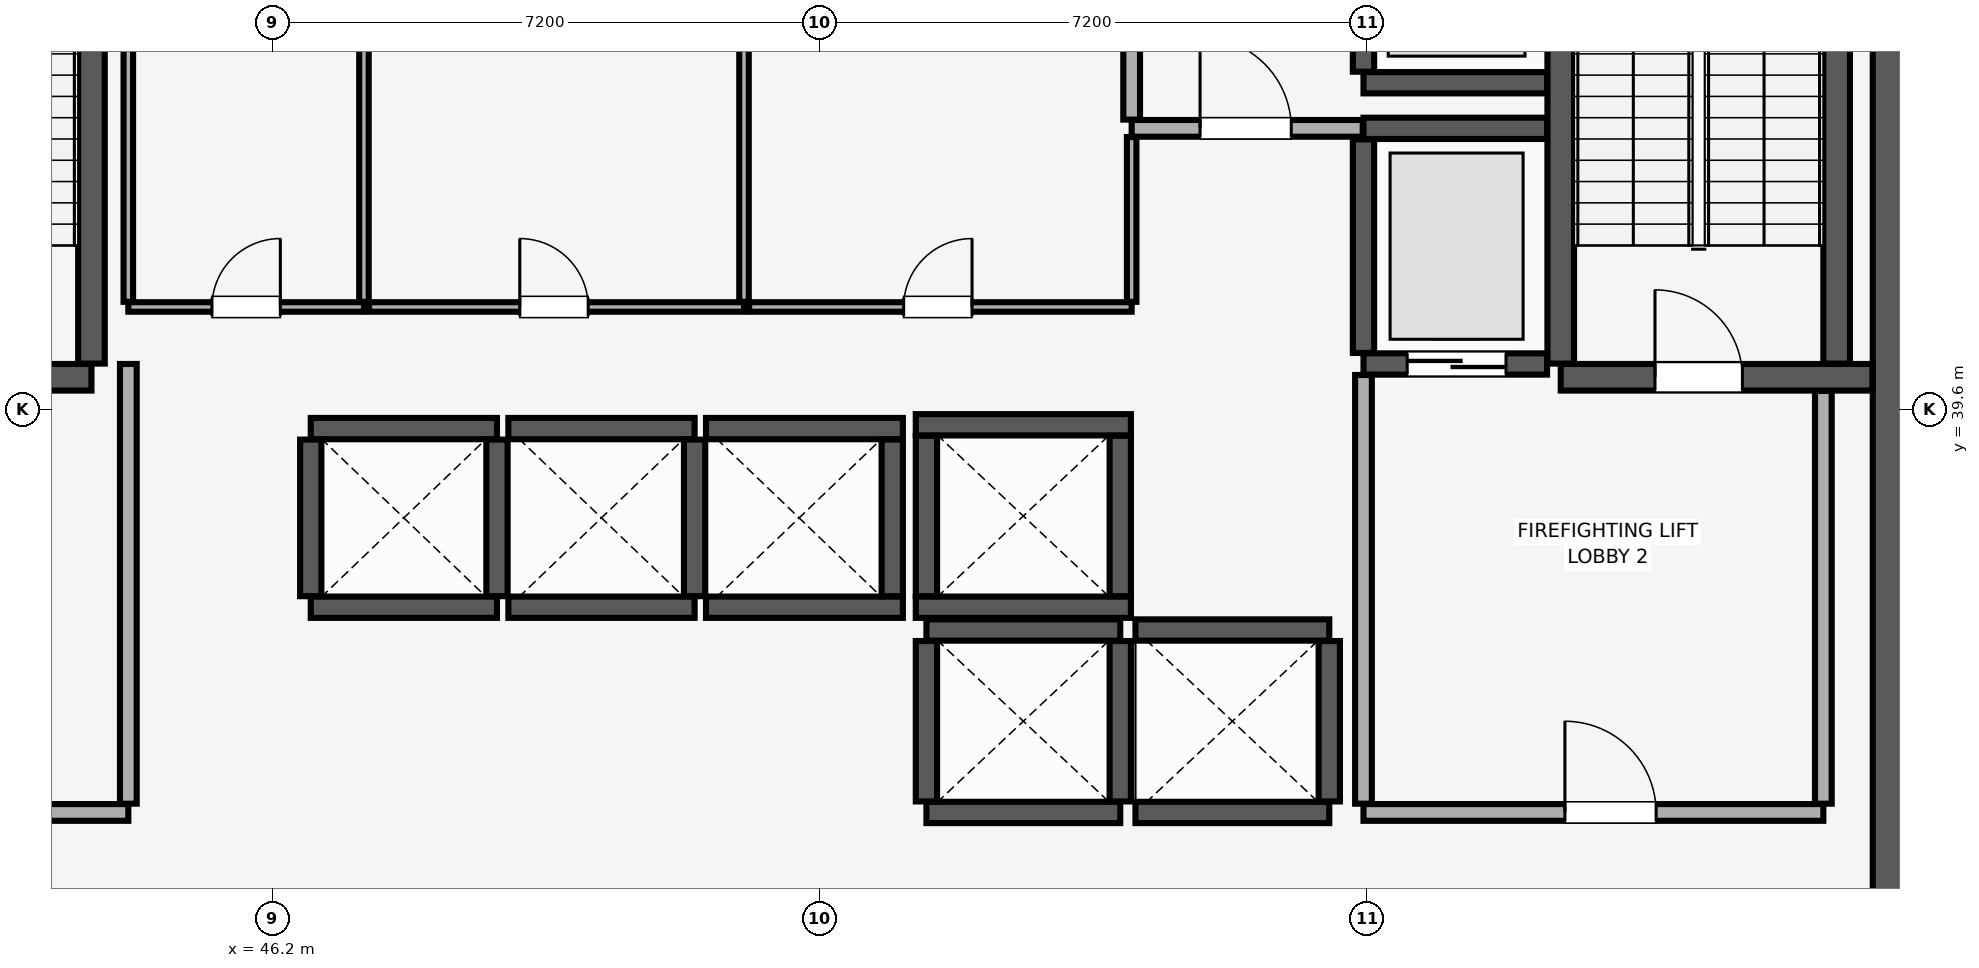
"""IFC4 building model, lengths in metres.
Left out: names, types, materials, properties, quantities, classifications, styles, units other than length and angle.
Written with IfcOpenShell. Run it as: python <this file> out.ifc"""

import sys

from ifc_helpers import new_model, si_unit, direction, frame, frame_2d, origin, place, context, subcontext, project, spatial, rectangle, extrude, element, fill, save


model = new_model("IFC4")
c1 = context("Model", 3, precision=1e-05, world=origin(), true_north=direction((0.0, 1.0)))
c2 = subcontext(c1, "Body", "Model", "MODEL_VIEW")
j1 = project(units=[si_unit("LENGTHUNIT", "METRE"), si_unit("PLANEANGLEUNIT", "RADIAN")], contexts=[c1])
p1 = place(None, origin())
s1 = spatial("IfcSite", under=j1, at=p1, CompositionType="ELEMENT")
p2 = place(p1, origin())
s2 = spatial("IfcBuilding", under=s1, at=p2, CompositionType="ELEMENT")
p3 = place(p2, frame((0.0, 0.0, 80.15)))
s3 = spatial("IfcBuildingStorey", under=s2, at=p3, CompositionType="ELEMENT", Elevation=80.15)
p4 = place(p3, frame((67.8, 29.4, 0.0), z_axis=(0.0, 0.0, 1.0), x_axis=(0.0, 1.0, 0.0)))
e1 = element("IfcWall", 1, at=p4, inside=s3, PredefinedType="SHEAR", context=c2, shape_type="SweptSolid", body=[
    extrude(rectangle(XDim=19.2, YDim=1.1, at=frame_2d((9.6, 0.0))), origin(), (0.0, 0.0, 1.0), 5.16),
])
p5 = place(p3, frame((40.185, 40.025, 0.0), z_axis=(0.0, 0.0, 1.0), x_axis=(1.0, 0.0, 0.0)))
e2 = element("IfcWall", 2, at=p5, inside=s3, PredefinedType="SHEAR", context=c2, shape_type="SweptSolid", body=[
    extrude(rectangle(XDim=3.63, YDim=0.35, at=frame_2d((1.815, 0.0))), origin(), (0.0, 0.0, 1.0), 5.16),
])
p6 = place(p5, frame((1.24, 0.0, 0.0)))
e3 = element("IfcOpeningElement", 3, at=p6, cuts=e2, PredefinedType="OPENING", context=c2, shape_type="SweptSolid", body=[
    extrude(rectangle(XDim=1.15, YDim=2.15, at=frame_2d((0.575, 1.075))), frame((0.0, 0.185, 0.0), z_axis=(0.0, -1.0, 0.0), x_axis=(1.0, 0.0, 0.0)), (0.0, 0.0, 1.0), 0.37),
])
p7 = place(p3, frame((43.815, 40.205, 0.0), z_axis=(0.0, 0.0, 1.0), x_axis=(0.0, 1.0, 0.0)))
e4 = element("IfcWall", 4, at=p7, inside=s3, PredefinedType="SHEAR", context=c2, shape_type="SweptSolid", body=[
    extrude(rectangle(XDim=8.09, YDim=0.35, at=frame_2d((4.045, 0.0))), origin(), (0.0, 0.0, 1.0), 5.16),
])
p8 = place(p3, frame((63.145, 40.025, 0.0), z_axis=(0.0, 0.0, 1.0), x_axis=(1.0, 0.0, 0.0)))
e5 = element("IfcWall", 5, at=p8, inside=s3, PredefinedType="SHEAR", context=c2, shape_type="SweptSolid", body=[
    extrude(rectangle(XDim=4.1, YDim=0.35, at=frame_2d((2.05, 0.0))), origin(), (0.0, 0.0, 1.0), 5.16),
])
p9 = place(p8, frame((1.24, 0.0, 0.0)))
e6 = element("IfcOpeningElement", 6, at=p9, cuts=e5, PredefinedType="OPENING", context=c2, shape_type="SweptSolid", body=[
    extrude(rectangle(XDim=1.15, YDim=2.15, at=frame_2d((0.575, 1.075))), frame((0.0, 0.185, 0.0), z_axis=(0.0, -1.0, 0.0), x_axis=(1.0, 0.0, 0.0)), (0.0, 0.0, 1.0), 0.37),
])
for number, where, z_axis, x_axis in (
    (7, (63.145, 40.205, 0.0), (0.0, 0.0, 1.0), (0.0, 1.0, 0.0)),
    (8, (66.775, 40.205, 0.0), (0.0, 0.0, 1.0), (0.0, 1.0, 0.0)),
):
    element("IfcWall", number, at=place(p3, frame(where, z_axis=z_axis, x_axis=x_axis)), inside=s3, PredefinedType="SHEAR", context=c2, shape_type="SweptSolid", body=[
        extrude(rectangle(XDim=8.09, YDim=0.35, at=frame_2d((4.045, 0.0))), origin(), (0.0, 0.0, 1.0), 5.16),
    ])
for number, where, z_axis, x_axis in (
    (9, (46.7, 37.0, 0.0), (0.0, 0.0, 1.0), (1.0, 0.0, 0.0)),
    (10, (46.7, 39.35, 0.0), (0.0, 0.0, 1.0), (1.0, 0.0, 0.0)),
):
    element("IfcWall", number, at=place(p3, frame(where, z_axis=z_axis, x_axis=x_axis)), inside=s3, PredefinedType="SHEAR", context=c2, shape_type="SweptSolid", body=[
        extrude(rectangle(XDim=2.45, YDim=0.28, at=frame_2d((1.225, 0.0))), origin(), (0.0, 0.0, 1.0), 5.16),
    ])
for number, where, z_axis, x_axis in (
    (11, (46.7, 37.145, 0.0), (0.0, 0.0, 1.0), (0.0, 1.0, 0.0)),
    (12, (49.15, 37.145, 0.0), (0.0, 0.0, 1.0), (0.0, 1.0, 0.0)),
):
    element("IfcWall", number, at=place(p3, frame(where, z_axis=z_axis, x_axis=x_axis)), inside=s3, PredefinedType="SHEAR", context=c2, shape_type="SweptSolid", body=[
        extrude(rectangle(XDim=2.06, YDim=0.28, at=frame_2d((1.03, 0.0))), origin(), (0.0, 0.0, 1.0), 5.16),
    ])
for number, where, z_axis, x_axis in (
    (13, (49.3, 37.0, 0.0), (0.0, 0.0, 1.0), (1.0, 0.0, 0.0)),
    (14, (49.3, 39.35, 0.0), (0.0, 0.0, 1.0), (1.0, 0.0, 0.0)),
):
    element("IfcWall", number, at=place(p3, frame(where, z_axis=z_axis, x_axis=x_axis)), inside=s3, PredefinedType="SHEAR", context=c2, shape_type="SweptSolid", body=[
        extrude(rectangle(XDim=2.45, YDim=0.28, at=frame_2d((1.225, 0.0))), origin(), (0.0, 0.0, 1.0), 5.16),
    ])
p10 = place(p3, frame((51.75, 37.145, 0.0), z_axis=(0.0, 0.0, 1.0), x_axis=(0.0, 1.0, 0.0)))
e15 = element("IfcWall", 15, at=p10, inside=s3, PredefinedType="SHEAR", context=c2, shape_type="SweptSolid", body=[
    extrude(rectangle(XDim=2.06, YDim=0.28, at=frame_2d((1.03, 0.0))), origin(), (0.0, 0.0, 1.0), 5.16),
])
for number, where, z_axis, x_axis in (
    (16, (51.9, 37.0, 0.0), (0.0, 0.0, 1.0), (1.0, 0.0, 0.0)),
    (17, (51.9, 39.35, 0.0), (0.0, 0.0, 1.0), (1.0, 0.0, 0.0)),
):
    element("IfcWall", number, at=place(p3, frame(where, z_axis=z_axis, x_axis=x_axis)), inside=s3, PredefinedType="SHEAR", context=c2, shape_type="SweptSolid", body=[
        extrude(rectangle(XDim=2.59, YDim=0.28, at=frame_2d((1.295, 0.0))), origin(), (0.0, 0.0, 1.0), 5.16),
    ])
p11 = place(p3, frame((54.35, 37.145, 0.0), z_axis=(0.0, 0.0, 1.0), x_axis=(0.0, 1.0, 0.0)))
e18 = element("IfcWall", 18, at=p11, inside=s3, PredefinedType="SHEAR", context=c2, shape_type="SweptSolid", body=[
    extrude(rectangle(XDim=2.06, YDim=0.28, at=frame_2d((1.03, 0.0))), origin(), (0.0, 0.0, 1.0), 5.16),
])
for number, where, z_axis, x_axis in (
    (19, (54.8, 34.3, 0.0), (0.0, 0.0, 1.0), (1.0, 0.0, 0.0)),
    (20, (54.8, 36.7, 0.0), (0.0, 0.0, 1.0), (1.0, 0.0, 0.0)),
):
    element("IfcWall", number, at=place(p3, frame(where, z_axis=z_axis, x_axis=x_axis)), inside=s3, PredefinedType="SHEAR", context=c2, shape_type="SweptSolid", body=[
        extrude(rectangle(XDim=2.55, YDim=0.28, at=frame_2d((1.275, 0.0))), origin(), (0.0, 0.0, 1.0), 5.16),
    ])
for number, where, z_axis, x_axis in (
    (21, (54.8, 34.445, 0.0), (0.0, 0.0, 1.0), (0.0, 1.0, 0.0)),
    (22, (57.35, 34.445, 0.0), (0.0, 0.0, 1.0), (0.0, 1.0, 0.0)),
):
    element("IfcWall", number, at=place(p3, frame(where, z_axis=z_axis, x_axis=x_axis)), inside=s3, PredefinedType="SHEAR", context=c2, shape_type="SweptSolid", body=[
        extrude(rectangle(XDim=2.11, YDim=0.28, at=frame_2d((1.055, 0.0))), origin(), (0.0, 0.0, 1.0), 5.16),
    ])
for number, where, z_axis, x_axis in (
    (23, (57.55, 34.3, 0.0), (0.0, 0.0, 1.0), (1.0, 0.0, 0.0)),
    (24, (57.55, 36.7, 0.0), (0.0, 0.0, 1.0), (1.0, 0.0, 0.0)),
):
    element("IfcWall", number, at=place(p3, frame(where, z_axis=z_axis, x_axis=x_axis)), inside=s3, PredefinedType="SHEAR", context=c2, shape_type="SweptSolid", body=[
        extrude(rectangle(XDim=2.55, YDim=0.28, at=frame_2d((1.275, 0.0))), origin(), (0.0, 0.0, 1.0), 5.16),
    ])
p12 = place(p3, frame((60.1, 34.445, 0.0), z_axis=(0.0, 0.0, 1.0), x_axis=(0.0, 1.0, 0.0)))
e25 = element("IfcWall", 25, at=p12, inside=s3, PredefinedType="SHEAR", context=c2, shape_type="SweptSolid", body=[
    extrude(rectangle(XDim=2.11, YDim=0.28, at=frame_2d((1.055, 0.0))), origin(), (0.0, 0.0, 1.0), 5.16),
])
for number, where, z_axis, x_axis in (
    (26, (54.66, 37.0, 0.0), (0.0, 0.0, 1.0), (1.0, 0.0, 0.0)),
    (27, (54.66, 39.4, 0.0), (0.0, 0.0, 1.0), (1.0, 0.0, 0.0)),
):
    element("IfcWall", number, at=place(p3, frame(where, z_axis=z_axis, x_axis=x_axis)), inside=s3, PredefinedType="SHEAR", context=c2, shape_type="SweptSolid", body=[
        extrude(rectangle(XDim=2.83, YDim=0.28, at=frame_2d((1.415, 0.0))), origin(), (0.0, 0.0, 1.0), 5.16),
    ])
for number, where, z_axis, x_axis in (
    (28, (54.8, 37.145, 0.0), (0.0, 0.0, 1.0), (0.0, 1.0, 0.0)),
    (29, (57.35, 37.145, 0.0), (0.0, 0.0, 1.0), (0.0, 1.0, 0.0)),
):
    element("IfcWall", number, at=place(p3, frame(where, z_axis=z_axis, x_axis=x_axis)), inside=s3, PredefinedType="SHEAR", context=c2, shape_type="SweptSolid", body=[
        extrude(rectangle(XDim=2.11, YDim=0.28, at=frame_2d((1.055, 0.0))), origin(), (0.0, 0.0, 1.0), 5.16),
    ])
p13 = place(p3, frame((60.55, 40.2, 0.0), z_axis=(0.0, 0.0, 1.0), x_axis=(1.0, 0.0, 0.0)))
e30 = element("IfcWall", 30, at=p13, inside=s3, PredefinedType="SHEAR", context=c2, shape_type="SweptSolid", body=[
    extrude(rectangle(XDim=2.415, YDim=0.28, at=frame_2d((1.208, 0.0))), origin(), (0.0, 0.0, 1.0), 5.16),
])
p14 = place(p13, frame((0.575, 0.0, 0.0)))
e31 = element("IfcOpeningElement", 31, at=p14, cuts=e30, PredefinedType="OPENING", context=c2, shape_type="SweptSolid", body=[
    extrude(rectangle(XDim=1.3, YDim=2.3, at=frame_2d((0.65, 1.15))), frame((0.0, 0.15, 0.0), z_axis=(0.0, -1.0, 0.0), x_axis=(1.0, 0.0, 0.0)), (0.0, 0.0, 1.0), 0.3),
])
p15 = place(p3, frame((60.55, 43.3, 0.0), z_axis=(0.0, 0.0, 1.0), x_axis=(1.0, 0.0, 0.0)))
e32 = element("IfcWall", 32, at=p15, inside=s3, PredefinedType="SHEAR", context=c2, shape_type="SweptSolid", body=[
    extrude(rectangle(XDim=2.415, YDim=0.28, at=frame_2d((1.208, 0.0))), origin(), (0.0, 0.0, 1.0), 5.16),
])
p16 = place(p3, frame((60.55, 40.345, 0.0), z_axis=(0.0, 0.0, 1.0), x_axis=(0.0, 1.0, 0.0)))
e33 = element("IfcWall", 33, at=p16, inside=s3, PredefinedType="SHEAR", context=c2, shape_type="SweptSolid", body=[
    extrude(rectangle(XDim=2.81, YDim=0.28, at=frame_2d((1.405, 0.0))), origin(), (0.0, 0.0, 1.0), 5.16),
])
p17 = place(p3, frame((60.55, 43.9, 0.0), z_axis=(0.0, 0.0, 1.0), x_axis=(1.0, 0.0, 0.0)))
e34 = element("IfcWall", 34, at=p17, inside=s3, PredefinedType="SHEAR", context=c2, shape_type="SweptSolid", body=[
    extrude(rectangle(XDim=2.415, YDim=0.28, at=frame_2d((1.208, 0.0))), origin(), (0.0, 0.0, 1.0), 5.16),
])
p18 = place(p3, frame((60.55, 44.045, 0.0), z_axis=(0.0, 0.0, 1.0), x_axis=(0.0, 1.0, 0.0)))
e35 = element("IfcWall", 35, at=p18, inside=s3, PredefinedType="SHEAR", context=c2, shape_type="SweptSolid", body=[
    extrude(rectangle(XDim=3.11, YDim=0.28, at=frame_2d((1.555, 0.0))), origin(), (0.0, 0.0, 1.0), 5.16),
])
p19 = place(p18, frame((0.905, 0.0, 0.0)))
e36 = element("IfcOpeningElement", 36, at=p19, cuts=e35, PredefinedType="OPENING", context=c2, shape_type="SweptSolid", body=[
    extrude(rectangle(XDim=1.3, YDim=2.3, at=frame_2d((0.65, 1.15))), frame((0.0, 0.15, 0.0), z_axis=(0.0, -1.0, 0.0), x_axis=(1.0, 0.0, 0.0)), (0.0, 0.0, 1.0), 0.3),
])
p20 = place(p3, frame((60.55, 34.3, 0.0), z_axis=(0.0, 0.0, 1.0), x_axis=(1.0, 0.0, 0.0)))
e37 = element("IfcWall", 37, at=p20, inside=s3, PredefinedType="PARTITIONING", context=c2, shape_type="SweptSolid", body=[
    extrude(rectangle(XDim=6.05, YDim=0.22, at=frame_2d((3.025, 0.0))), origin(), (0.0, 0.0, 1.0), 5.16),
])
p21 = place(p20, frame((2.65, 0.0, 0.0)))
e38 = element("IfcOpeningElement", 38, at=p21, cuts=e37, PredefinedType="OPENING", context=c2, shape_type="SweptSolid", body=[
    extrude(rectangle(XDim=1.2, YDim=2.15, at=frame_2d((0.6, 1.075))), frame((0.0, 0.12, 0.0), z_axis=(0.0, -1.0, 0.0), x_axis=(1.0, 0.0, 0.0)), (0.0, 0.0, 1.0), 0.24),
])
p22 = place(p3, frame((60.55, 34.415, 0.0), z_axis=(0.0, 0.0, 1.0), x_axis=(0.0, 1.0, 0.0)))
e39 = element("IfcWall", 39, at=p22, inside=s3, PredefinedType="PARTITIONING", context=c2, shape_type="SweptSolid", body=[
    extrude(rectangle(XDim=5.64, YDim=0.22, at=frame_2d((2.82, 0.0))), origin(), (0.0, 0.0, 1.0), 5.16),
])
p23 = place(p3, frame((66.6, 34.415, 0.0), z_axis=(0.0, 0.0, 1.0), x_axis=(0.0, 1.0, 0.0)))
e40 = element("IfcWall", 40, at=p23, inside=s3, PredefinedType="PARTITIONING", context=c2, shape_type="SweptSolid", body=[
    extrude(rectangle(XDim=5.43, YDim=0.22, at=frame_2d((2.715, 0.0))), origin(), (0.0, 0.0, 1.0), 5.16),
])
p24 = place(p3, frame((39.7, 34.3, 0.0), z_axis=(0.0, 0.0, 1.0), x_axis=(1.0, 0.0, 0.0)))
e41 = element("IfcWall", 41, at=p24, inside=s3, PredefinedType="PARTITIONING", context=c2, shape_type="SweptSolid", body=[
    extrude(rectangle(XDim=4.6, YDim=0.22, at=frame_2d((2.3, 0.0))), origin(), (0.0, 0.0, 1.0), 5.16),
])
p25 = place(p24, frame((1.7, 0.0, 0.0)))
e42 = element("IfcOpeningElement", 42, at=p25, cuts=e41, PredefinedType="OPENING", context=c2, shape_type="SweptSolid", body=[
    extrude(rectangle(XDim=1.2, YDim=2.15, at=frame_2d((0.6, 1.075))), frame((0.0, 0.12, 0.0), z_axis=(0.0, -1.0, 0.0), x_axis=(1.0, 0.0, 0.0)), (0.0, 0.0, 1.0), 0.24),
])
p26 = place(p3, frame((44.3, 34.415, 0.0), z_axis=(0.0, 0.0, 1.0), x_axis=(0.0, 1.0, 0.0)))
e43 = element("IfcWall", 43, at=p26, inside=s3, PredefinedType="PARTITIONING", context=c2, shape_type="SweptSolid", body=[
    extrude(rectangle(XDim=5.785, YDim=0.22, at=frame_2d((2.893, 0.0))), origin(), (0.0, 0.0, 1.0), 5.16),
])
p27 = place(p3, frame((57.5, 43.3, 0.0), z_axis=(0.0, 0.0, 1.0), x_axis=(1.0, 0.0, 0.0)))
e44 = element("IfcWall", 44, at=p27, inside=s3, PredefinedType="PARTITIONING", context=c2, shape_type="SweptSolid", body=[
    extrude(rectangle(XDim=3.04, YDim=0.22, at=frame_2d((1.52, 0.0))), origin(), (0.0, 0.0, 1.0), 5.16),
])
p28 = place(p27, frame((0.9, 0.0, 0.0)))
e45 = element("IfcOpeningElement", 45, at=p28, cuts=e44, PredefinedType="OPENING", context=c2, shape_type="SweptSolid", body=[
    extrude(rectangle(XDim=1.2, YDim=2.15, at=frame_2d((0.6, 1.075))), frame((0.0, 0.12, 0.0), z_axis=(0.0, -1.0, 0.0), x_axis=(1.0, 0.0, 0.0)), (0.0, 0.0, 1.0), 0.24),
])
p29 = place(p3, frame((57.5, 43.415, 0.0), z_axis=(0.0, 0.0, 1.0), x_axis=(0.0, 1.0, 0.0)))
e46 = element("IfcWall", 46, at=p29, inside=s3, PredefinedType="PARTITIONING", context=c2, shape_type="SweptSolid", body=[
    extrude(rectangle(XDim=5.435, YDim=0.22, at=frame_2d((2.718, 0.0))), origin(), (0.0, 0.0, 1.0), 5.16),
])
p30 = place(p3, frame((44.3, 40.95, 0.0), z_axis=(0.0, 0.0, 1.0), x_axis=(1.0, 0.0, 0.0)))
e47 = element("IfcWall", 47, at=p30, inside=s3, PredefinedType="PARTITIONING", context=c2, shape_type="SweptSolid", body=[
    extrude(rectangle(XDim=3.1, YDim=0.125, at=frame_2d((1.55, 0.0))), origin(), (0.0, 0.0, 1.0), 5.16),
])
p31 = place(p30, frame((1.1, 0.0, 0.0)))
e48 = element("IfcOpeningElement", 48, at=p31, cuts=e47, PredefinedType="OPENING", context=c2, shape_type="SweptSolid", body=[
    extrude(rectangle(XDim=0.9, YDim=2.1, at=frame_2d((0.45, 1.05))), frame((0.0, 0.073, 0.0), z_axis=(0.0, -1.0, 0.0), x_axis=(1.0, 0.0, 0.0)), (0.0, 0.0, 1.0), 0.145),
])
for number, where, z_axis, x_axis in (
    (49, (44.3, 41.018, 0.0), (0.0, 0.0, 1.0), (0.0, 1.0, 0.0)),
    (50, (47.4, 41.018, 0.0), (0.0, 0.0, 1.0), (0.0, 1.0, 0.0)),
):
    element("IfcWall", number, at=place(p3, frame(where, z_axis=z_axis, x_axis=x_axis)), inside=s3, PredefinedType="PARTITIONING", context=c2, shape_type="SweptSolid", body=[
        extrude(rectangle(XDim=7.833, YDim=0.125, at=frame_2d((3.916, 0.0))), origin(), (0.0, 0.0, 1.0), 5.16),
    ])
p32 = place(p3, frame((47.468, 40.95, 0.0), z_axis=(0.0, 0.0, 1.0), x_axis=(1.0, 0.0, 0.0)))
e51 = element("IfcWall", 51, at=p32, inside=s3, PredefinedType="PARTITIONING", context=c2, shape_type="SweptSolid", body=[
    extrude(rectangle(XDim=4.932, YDim=0.125, at=frame_2d((2.466, 0.0))), origin(), (0.0, 0.0, 1.0), 5.16),
])
p33 = place(p32, frame((1.982, 0.0, 0.0)))
e52 = element("IfcOpeningElement", 52, at=p33, cuts=e51, PredefinedType="OPENING", context=c2, shape_type="SweptSolid", body=[
    extrude(rectangle(XDim=0.9, YDim=2.1, at=frame_2d((0.45, 1.05))), frame((0.0, 0.073, 0.0), z_axis=(0.0, -1.0, 0.0), x_axis=(1.0, 0.0, 0.0)), (0.0, 0.0, 1.0), 0.145),
])
p34 = place(p3, frame((52.4, 41.018, 0.0), z_axis=(0.0, 0.0, 1.0), x_axis=(0.0, 1.0, 0.0)))
e53 = element("IfcWall", 53, at=p34, inside=s3, PredefinedType="PARTITIONING", context=c2, shape_type="SweptSolid", body=[
    extrude(rectangle(XDim=7.833, YDim=0.125, at=frame_2d((3.916, 0.0))), origin(), (0.0, 0.0, 1.0), 5.16),
])
p35 = place(p3, frame((52.468, 40.95, 0.0), z_axis=(0.0, 0.0, 1.0), x_axis=(1.0, 0.0, 0.0)))
e54 = element("IfcWall", 54, at=p35, inside=s3, PredefinedType="PARTITIONING", context=c2, shape_type="SweptSolid", body=[
    extrude(rectangle(XDim=5.032, YDim=0.125, at=frame_2d((2.516, 0.0))), origin(), (0.0, 0.0, 1.0), 5.16),
])
p36 = place(p35, frame((2.032, 0.0, 0.0)))
e55 = element("IfcOpeningElement", 55, at=p36, cuts=e54, PredefinedType="OPENING", context=c2, shape_type="SweptSolid", body=[
    extrude(rectangle(XDim=0.9, YDim=2.1, at=frame_2d((0.45, 1.05))), frame((0.0, 0.073, 0.0), z_axis=(0.0, -1.0, 0.0), x_axis=(1.0, 0.0, 0.0)), (0.0, 0.0, 1.0), 0.145),
])
p37 = place(p3, frame((57.5, 41.018, 0.0), z_axis=(0.0, 0.0, 1.0), x_axis=(0.0, 1.0, 0.0)))
e56 = element("IfcWall", 56, at=p37, inside=s3, PredefinedType="PARTITIONING", context=c2, shape_type="SweptSolid", body=[
    extrude(rectangle(XDim=2.167, YDim=0.125, at=frame_2d((1.084, 0.0))), origin(), (0.0, 0.0, 1.0), 5.16),
])
p38 = place(p9, origin())
e57 = element("IfcDoor", 57, at=p38, inside=s3, OperationType="SINGLE_SWING_LEFT", PredefinedType="DOOR", context=c2, shape_type="SweptSolid", body=[
    extrude(rectangle(XDim=1.15, YDim=2.15, at=frame_2d((0.575, 1.075))), frame((0.0, 0.025, 0.0), z_axis=(0.0, -1.0, 0.0), x_axis=(1.0, 0.0, 0.0)), (0.0, 0.0, 1.0), 0.05),
])
fill(e6, e57)
p39 = place(p14, origin())
e58 = element("IfcDoor", 58, at=p39, inside=s3, OperationType="DOUBLE_DOOR_SLIDING", PredefinedType="DOOR", context=c2, shape_type="SweptSolid", body=[
    extrude(rectangle(XDim=1.3, YDim=2.3, at=frame_2d((0.65, 1.15))), frame((0.0, 0.025, 0.0), z_axis=(0.0, -1.0, 0.0), x_axis=(1.0, 0.0, 0.0)), (0.0, 0.0, 1.0), 0.05),
])
fill(e31, e58)
p40 = place(p21, origin())
e59 = element("IfcDoor", 59, at=p40, inside=s3, OperationType="SINGLE_SWING_LEFT", PredefinedType="DOOR", context=c2, shape_type="SweptSolid", body=[
    extrude(rectangle(XDim=1.2, YDim=2.15, at=frame_2d((0.6, 1.075))), frame((0.0, 0.025, 0.0), z_axis=(0.0, -1.0, 0.0), x_axis=(1.0, 0.0, 0.0)), (0.0, 0.0, 1.0), 0.05),
])
fill(e38, e59)
p41 = place(p28, origin())
e60 = element("IfcDoor", 60, at=p41, inside=s3, OperationType="SINGLE_SWING_LEFT", PredefinedType="DOOR", context=c2, shape_type="SweptSolid", body=[
    extrude(rectangle(XDim=1.2, YDim=2.15, at=frame_2d((0.6, 1.075))), frame((0.0, 0.025, 0.0), z_axis=(0.0, -1.0, 0.0), x_axis=(1.0, 0.0, 0.0)), (0.0, 0.0, 1.0), 0.05),
])
fill(e45, e60)
p42 = place(p31, origin())
e61 = element("IfcDoor", 61, at=p42, inside=s3, OperationType="SINGLE_SWING_RIGHT", PredefinedType="DOOR", context=c2, shape_type="SweptSolid", body=[
    extrude(rectangle(XDim=0.9, YDim=2.1, at=frame_2d((0.45, 1.05))), frame((0.0, 0.025, 0.0), z_axis=(0.0, -1.0, 0.0), x_axis=(1.0, 0.0, 0.0)), (0.0, 0.0, 1.0), 0.05),
])
fill(e48, e61)
p43 = place(p33, origin())
e62 = element("IfcDoor", 62, at=p43, inside=s3, OperationType="SINGLE_SWING_LEFT", PredefinedType="DOOR", context=c2, shape_type="SweptSolid", body=[
    extrude(rectangle(XDim=0.9, YDim=2.1, at=frame_2d((0.45, 1.05))), frame((0.0, 0.025, 0.0), z_axis=(0.0, -1.0, 0.0), x_axis=(1.0, 0.0, 0.0)), (0.0, 0.0, 1.0), 0.05),
])
fill(e52, e62)
p44 = place(p36, origin())
e63 = element("IfcDoor", 63, at=p44, inside=s3, OperationType="SINGLE_SWING_RIGHT", PredefinedType="DOOR", context=c2, shape_type="SweptSolid", body=[
    extrude(rectangle(XDim=0.9, YDim=2.1, at=frame_2d((0.45, 1.05))), frame((0.0, 0.025, 0.0), z_axis=(0.0, -1.0, 0.0), x_axis=(1.0, 0.0, 0.0)), (0.0, 0.0, 1.0), 0.05),
])
fill(e55, e63)
save(model, sys.argv[1])
